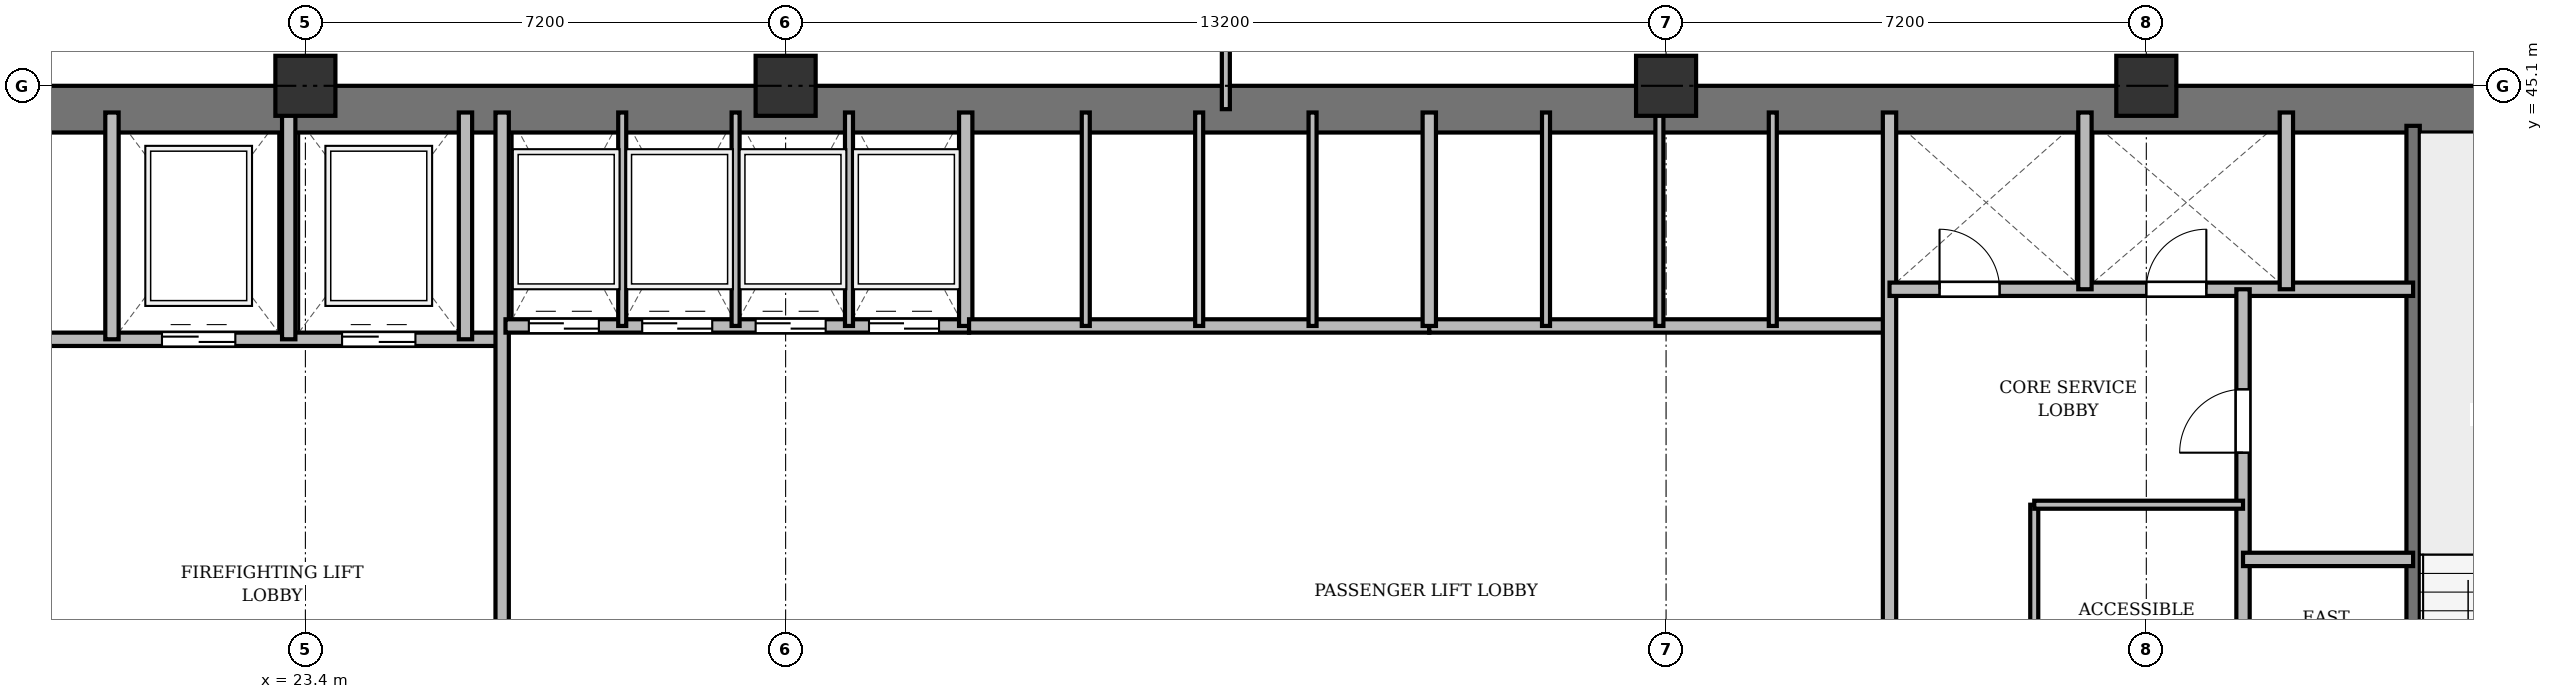
"""IFC4 building model, lengths in metres.
Left out: names, types, materials, properties, quantities, classifications, styles, units other than length and angle.
Written with IfcOpenShell. Run it as: python <this file> out.ifc"""

import sys

from ifc_helpers import new_model, si_unit, direction, frame, frame_2d, origin, origin_2d, place, context, subcontext, project, spatial, rectangle, extrude, source, transform, mapped, element, fill, save


model = new_model("IFC4")
c1 = context("Model", 3, precision=1e-05, world=origin(), true_north=direction((0.0, 1.0)))
c2 = subcontext(c1, "Body", "Model", "MODEL_VIEW")
j1 = project(units=[si_unit("LENGTHUNIT", "METRE"), si_unit("PLANEANGLEUNIT", "RADIAN")], contexts=[c1])
p1 = place(None, origin())
s1 = spatial("IfcSite", under=j1, at=p1, CompositionType="ELEMENT")
p2 = place(p1, origin())
s2 = spatial("IfcBuilding", under=s1, at=p2, CompositionType="ELEMENT")
p3 = place(p2, frame((0.0, 0.0, 23.5)))
s3 = spatial("IfcBuildingStorey", under=s2, at=p3, CompositionType="ELEMENT", Elevation=23.5)
m1 = source(origin(), c2, "Body", "SweptSolid", [
    extrude(rectangle(XDim=0.9, YDim=0.9, at=origin_2d()), origin(), (0.0, 0.0, 1.0), 3.6),
])
for number, where, z_axis, x_axis in (
    (1, (23.4, 45.1, 0.0), (0.0, 0.0, 1.0), (1.0, 0.0, 0.0)),
    (2, (30.6, 45.1, 0.0), (0.0, 0.0, 1.0), (1.0, 0.0, 0.0)),
    (3, (43.8, 45.1, 0.0), (0.0, 0.0, 1.0), (1.0, 0.0, 0.0)),
    (4, (51.0, 45.1, 0.0), (0.0, 0.0, 1.0), (1.0, 0.0, 0.0)),
):
    element("IfcColumn", number, at=place(p3, frame(where, z_axis=z_axis, x_axis=x_axis)), inside=s3, PredefinedType="COLUMN", context=c2, shape_type="MappedRepresentation", body=[
        mapped(m1, transform((0.0, 0.0, 0.0), x_axis=(1.0, 0.0, 0.0), y_axis=(0.0, 1.0, 0.0), z_axis=(0.0, 0.0, 1.0), scale=1.0)),
    ])
p4 = place(p3, frame((15.5, 44.75, 0.0), z_axis=(0.0, 0.0, 1.0), x_axis=(1.0, 0.0, 0.0)))
e5 = element("IfcWall", 5, at=p4, inside=s3, PredefinedType="SHEAR", context=c2, shape_type="SweptSolid", body=[
    extrude(rectangle(XDim=43.4, YDim=0.7, at=frame_2d((21.7, 0.0))), origin(), (0.0, 0.0, 1.0), 3.34),
])
p5 = place(p3, frame((55.0, 33.4, 0.0), z_axis=(0.0, 0.0, 1.0), x_axis=(0.0, 1.0, 0.0)))
e6 = element("IfcWall", 6, at=p5, inside=s3, PredefinedType="SHEAR", context=c2, shape_type="SweptSolid", body=[
    extrude(rectangle(XDim=11.1, YDim=0.2, at=frame_2d((5.55, 0.0))), origin(), (0.0, 0.0, 1.0), 3.34),
])
p6 = place(p5, frame((0.85, 0.0, 0.0)))
e7 = element("IfcOpeningElement", 7, at=p6, cuts=e6, PredefinedType="OPENING", context=c2, shape_type="SweptSolid", body=[
    extrude(rectangle(XDim=1.1, YDim=2.15, at=frame_2d((0.55, 1.075))), frame((0.0, 0.11, 0.0), z_axis=(0.0, -1.0, 0.0), x_axis=(1.0, 0.0, 0.0)), (0.0, 0.0, 1.0), 0.22),
])
p7 = place(p3, frame((19.55, 41.3, 0.0), z_axis=(0.0, 0.0, 1.0), x_axis=(1.0, 0.0, 0.0)))
e8 = element("IfcWall", 8, at=p7, inside=s3, PredefinedType="SOLIDWALL", context=c2, shape_type="SweptSolid", body=[
    extrude(rectangle(XDim=6.75, YDim=0.2, at=frame_2d((3.375, 0.0))), origin(), (0.0, 0.0, 1.0), 3.34),
])
p8 = place(p7, frame((1.7, 0.0, 0.0)))
e9 = element("IfcOpeningElement", 9, at=p8, cuts=e8, PredefinedType="OPENING", context=c2, shape_type="SweptSolid", body=[
    extrude(rectangle(XDim=1.1, YDim=2.15, at=frame_2d((0.55, 1.075))), frame((0.0, 0.11, 0.0), z_axis=(0.0, -1.0, 0.0), x_axis=(1.0, 0.0, 0.0)), (0.0, 0.0, 1.0), 0.22),
])
p9 = place(p7, frame((4.4, 0.0, 0.0)))
e10 = element("IfcOpeningElement", 10, at=p9, cuts=e8, PredefinedType="OPENING", context=c2, shape_type="SweptSolid", body=[
    extrude(rectangle(XDim=1.1, YDim=2.15, at=frame_2d((0.55, 1.075))), frame((0.0, 0.11, 0.0), z_axis=(0.0, -1.0, 0.0), x_axis=(1.0, 0.0, 0.0)), (0.0, 0.0, 1.0), 0.22),
])
for number, where, z_axis, x_axis in (
    (11, (20.5, 41.3, 0.0), (0.0, 0.0, 1.0), (0.0, 1.0, 0.0)),
    (12, (23.15, 41.3, 0.0), (0.0, 0.0, 1.0), (0.0, 1.0, 0.0)),
    (13, (25.8, 41.3, 0.0), (0.0, 0.0, 1.0), (0.0, 1.0, 0.0)),
):
    element("IfcWall", number, at=place(p3, frame(where, z_axis=z_axis, x_axis=x_axis)), inside=s3, PredefinedType="SOLIDWALL", context=c2, shape_type="SweptSolid", body=[
        extrude(rectangle(XDim=3.4, YDim=0.2, at=frame_2d((1.7, 0.0))), origin(), (0.0, 0.0, 1.0), 3.34),
    ])
p10 = place(p3, frame((26.35, 33.4, 0.0), z_axis=(0.0, 0.0, 1.0), x_axis=(0.0, 1.0, 0.0)))
e14 = element("IfcWall", 14, at=p10, inside=s3, PredefinedType="SOLIDWALL", context=c2, shape_type="SweptSolid", body=[
    extrude(rectangle(XDim=11.3, YDim=0.2, at=frame_2d((5.65, 0.0))), origin(), (0.0, 0.0, 1.0), 2.69),
])
p11 = place(p3, frame((26.4, 41.5, 0.0), z_axis=(0.0, 0.0, 1.0), x_axis=(1.0, 0.0, 0.0)))
e15 = element("IfcWall", 15, at=p11, inside=s3, PredefinedType="SOLIDWALL", context=c2, shape_type="SweptSolid", body=[
    extrude(rectangle(XDim=6.95, YDim=0.2, at=frame_2d((3.475, 0.0))), origin(), (0.0, 0.0, 1.0), 3.34),
])
p12 = place(p11, frame((0.35, 0.0, 0.0)))
e16 = element("IfcOpeningElement", 16, at=p12, cuts=e15, PredefinedType="OPENING", context=c2, shape_type="SweptSolid", body=[
    extrude(rectangle(XDim=1.05, YDim=2.15, at=frame_2d((0.525, 1.075))), frame((0.0, 0.11, 0.0), z_axis=(0.0, -1.0, 0.0), x_axis=(1.0, 0.0, 0.0)), (0.0, 0.0, 1.0), 0.22),
])
p13 = place(p11, frame((2.05, 0.0, 0.0)))
e17 = element("IfcOpeningElement", 17, at=p13, cuts=e15, PredefinedType="OPENING", context=c2, shape_type="SweptSolid", body=[
    extrude(rectangle(XDim=1.05, YDim=2.15, at=frame_2d((0.525, 1.075))), frame((0.0, 0.11, 0.0), z_axis=(0.0, -1.0, 0.0), x_axis=(1.0, 0.0, 0.0)), (0.0, 0.0, 1.0), 0.22),
])
p14 = place(p11, frame((3.75, 0.0, 0.0)))
e18 = element("IfcOpeningElement", 18, at=p14, cuts=e15, PredefinedType="OPENING", context=c2, shape_type="SweptSolid", body=[
    extrude(rectangle(XDim=1.05, YDim=2.15, at=frame_2d((0.525, 1.075))), frame((0.0, 0.11, 0.0), z_axis=(0.0, -1.0, 0.0), x_axis=(1.0, 0.0, 0.0)), (0.0, 0.0, 1.0), 0.22),
])
p15 = place(p11, frame((5.45, 0.0, 0.0)))
e19 = element("IfcOpeningElement", 19, at=p15, cuts=e15, PredefinedType="OPENING", context=c2, shape_type="SweptSolid", body=[
    extrude(rectangle(XDim=1.05, YDim=2.15, at=frame_2d((0.525, 1.075))), frame((0.0, 0.11, 0.0), z_axis=(0.0, -1.0, 0.0), x_axis=(1.0, 0.0, 0.0)), (0.0, 0.0, 1.0), 0.22),
])
p16 = place(p3, frame((33.3, 41.5, 0.0), z_axis=(0.0, 0.0, 1.0), x_axis=(0.0, 1.0, 0.0)))
e20 = element("IfcWall", 20, at=p16, inside=s3, PredefinedType="SOLIDWALL", context=c2, shape_type="SweptSolid", body=[
    extrude(rectangle(XDim=3.2, YDim=0.2, at=frame_2d((1.6, 0.0))), origin(), (0.0, 0.0, 1.0), 3.34),
])
for number, where, z_axis, x_axis in (
    (21, (28.15, 41.5, 0.0), (0.0, 0.0, 1.0), (0.0, 1.0, 0.0)),
    (22, (29.85, 41.5, 0.0), (0.0, 0.0, 1.0), (0.0, 1.0, 0.0)),
    (23, (31.55, 41.5, 0.0), (0.0, 0.0, 1.0), (0.0, 1.0, 0.0)),
):
    element("IfcWall", number, at=place(p3, frame(where, z_axis=z_axis, x_axis=x_axis)), inside=s3, PredefinedType="PARTITIONING", context=c2, shape_type="SweptSolid", body=[
        extrude(rectangle(XDim=3.2, YDim=0.12, at=frame_2d((1.6, 0.0))), origin(), (0.0, 0.0, 1.0), 3.34),
    ])
p17 = place(p3, frame((33.35, 41.5, 0.0), z_axis=(0.0, 0.0, 1.0), x_axis=(1.0, 0.0, 0.0)))
e24 = element("IfcWall", 24, at=p17, inside=s3, PredefinedType="SOLIDWALL", context=c2, shape_type="SweptSolid", body=[
    extrude(rectangle(XDim=6.9, YDim=0.2, at=frame_2d((3.45, 0.0))), origin(), (0.0, 0.0, 1.0), 3.34),
])
for number, where, z_axis, x_axis in (
    (25, (35.1, 41.5, 0.0), (0.0, 0.0, 1.0), (0.0, 1.0, 0.0)),
    (26, (36.8, 41.5, 0.0), (0.0, 0.0, 1.0), (0.0, 1.0, 0.0)),
    (27, (38.5, 41.5, 0.0), (0.0, 0.0, 1.0), (0.0, 1.0, 0.0)),
):
    element("IfcWall", number, at=place(p3, frame(where, z_axis=z_axis, x_axis=x_axis)), inside=s3, PredefinedType="PARTITIONING", context=c2, shape_type="SweptSolid", body=[
        extrude(rectangle(XDim=3.2, YDim=0.12, at=frame_2d((1.6, 0.0))), origin(), (0.0, 0.0, 1.0), 3.34),
    ])
p18 = place(p3, frame((40.25, 41.5, 0.0), z_axis=(0.0, 0.0, 1.0), x_axis=(1.0, 0.0, 0.0)))
e28 = element("IfcWall", 28, at=p18, inside=s3, PredefinedType="SOLIDWALL", context=c2, shape_type="SweptSolid", body=[
    extrude(rectangle(XDim=6.9, YDim=0.2, at=frame_2d((3.45, 0.0))), origin(), (0.0, 0.0, 1.0), 2.752),
])
p19 = place(p3, frame((40.25, 41.5, 0.0), z_axis=(0.0, 0.0, 1.0), x_axis=(0.0, 1.0, 0.0)))
e29 = element("IfcWall", 29, at=p19, inside=s3, PredefinedType="SOLIDWALL", context=c2, shape_type="SweptSolid", body=[
    extrude(rectangle(XDim=3.2, YDim=0.2, at=frame_2d((1.6, 0.0))), origin(), (0.0, 0.0, 1.0), 3.34),
])
p20 = place(p3, frame((42.0, 41.5, 0.0), z_axis=(0.0, 0.0, 1.0), x_axis=(0.0, 1.0, 0.0)))
e30 = element("IfcWall", 30, at=p20, inside=s3, PredefinedType="PARTITIONING", context=c2, shape_type="SweptSolid", body=[
    extrude(rectangle(XDim=3.2, YDim=0.12, at=frame_2d((1.6, 0.0))), origin(), (0.0, 0.0, 1.0), 3.34),
])
p21 = place(p3, frame((43.7, 41.5, 0.0), z_axis=(0.0, 0.0, 1.0), x_axis=(0.0, 1.0, 0.0)))
e31 = element("IfcWall", 31, at=p21, inside=s3, PredefinedType="PARTITIONING", context=c2, shape_type="SweptSolid", body=[
    extrude(rectangle(XDim=3.2, YDim=0.12, at=frame_2d((1.6, 0.0))), origin(), (0.0, 0.0, 1.0), 2.752),
])
p22 = place(p3, frame((45.4, 41.5, 0.0), z_axis=(0.0, 0.0, 1.0), x_axis=(0.0, 1.0, 0.0)))
e32 = element("IfcWall", 32, at=p22, inside=s3, PredefinedType="PARTITIONING", context=c2, shape_type="SweptSolid", body=[
    extrude(rectangle(XDim=3.2, YDim=0.12, at=frame_2d((1.6, 0.0))), origin(), (0.0, 0.0, 1.0), 3.34),
])
p23 = place(p3, frame((47.15, 33.4, 0.0), z_axis=(0.0, 0.0, 1.0), x_axis=(0.0, 1.0, 0.0)))
e33 = element("IfcWall", 33, at=p23, inside=s3, PredefinedType="SOLIDWALL", context=c2, shape_type="SweptSolid", body=[
    extrude(rectangle(XDim=11.3, YDim=0.2, at=frame_2d((5.65, 0.0))), origin(), (0.0, 0.0, 1.0), 2.69),
])
p24 = place(p3, frame((47.15, 42.05, 0.0), z_axis=(0.0, 0.0, 1.0), x_axis=(1.0, 0.0, 0.0)))
e34 = element("IfcWall", 34, at=p24, inside=s3, PredefinedType="SOLIDWALL", context=c2, shape_type="SweptSolid", body=[
    extrude(rectangle(XDim=7.85, YDim=0.2, at=frame_2d((3.925, 0.0))), origin(), (0.0, 0.0, 1.0), 2.752),
])
p25 = place(p24, frame((0.75, 0.0, 0.0)))
e35 = element("IfcOpeningElement", 35, at=p25, cuts=e34, PredefinedType="OPENING", context=c2, shape_type="SweptSolid", body=[
    extrude(rectangle(XDim=0.9, YDim=2.1, at=frame_2d((0.45, 1.05))), frame((0.0, 0.11, 0.0), z_axis=(0.0, -1.0, 0.0), x_axis=(1.0, 0.0, 0.0)), (0.0, 0.0, 1.0), 0.22),
])
p26 = place(p24, frame((3.85, 0.0, 0.0)))
e36 = element("IfcOpeningElement", 36, at=p26, cuts=e34, PredefinedType="OPENING", context=c2, shape_type="SweptSolid", body=[
    extrude(rectangle(XDim=0.9, YDim=2.1, at=frame_2d((0.45, 1.05))), frame((0.0, 0.11, 0.0), z_axis=(0.0, -1.0, 0.0), x_axis=(1.0, 0.0, 0.0)), (0.0, 0.0, 1.0), 0.22),
])
for number, where, z_axis, x_axis in (
    (37, (50.08, 42.05, 0.0), (0.0, 0.0, 1.0), (0.0, 1.0, 0.0)),
    (38, (53.1, 42.05, 0.0), (0.0, 0.0, 1.0), (0.0, 1.0, 0.0)),
):
    element("IfcWall", number, at=place(p3, frame(where, z_axis=z_axis, x_axis=x_axis)), inside=s3, PredefinedType="SOLIDWALL", context=c2, shape_type="SweptSolid", body=[
        extrude(rectangle(XDim=2.65, YDim=0.2, at=frame_2d((1.325, 0.0))), origin(), (0.0, 0.0, 1.0), 3.34),
    ])
p27 = place(p3, frame((52.45, 33.4, 0.0), z_axis=(0.0, 0.0, 1.0), x_axis=(0.0, 1.0, 0.0)))
e39 = element("IfcWall", 39, at=p27, inside=s3, PredefinedType="PARTITIONING", context=c2, shape_type="SweptSolid", body=[
    extrude(rectangle(XDim=8.65, YDim=0.2, at=frame_2d((4.325, 0.0))), origin(), (0.0, 0.0, 1.0), 2.69),
])
p28 = place(p27, frame((6.2, 0.0, 0.0)))
e40 = element("IfcOpeningElement", 40, at=p28, cuts=e39, PredefinedType="OPENING", context=c2, shape_type="SweptSolid", body=[
    extrude(rectangle(XDim=0.95, YDim=2.15, at=frame_2d((0.475, 1.075))), frame((0.0, 0.11, 0.0), z_axis=(0.0, -1.0, 0.0), x_axis=(1.0, 0.0, 0.0)), (0.0, 0.0, 1.0), 0.22),
])
p29 = place(p3, frame((52.45, 38.0, 0.0), z_axis=(0.0, 0.0, 1.0), x_axis=(1.0, 0.0, 0.0)))
e41 = element("IfcWall", 41, at=p29, inside=s3, PredefinedType="PARTITIONING", context=c2, shape_type="SweptSolid", body=[
    extrude(rectangle(XDim=2.55, YDim=0.2, at=frame_2d((1.275, 0.0))), origin(), (0.0, 0.0, 1.0), 3.34),
])
p30 = place(p3, frame((49.32, 33.4, 0.0), z_axis=(0.0, 0.0, 1.0), x_axis=(0.0, 1.0, 0.0)))
e42 = element("IfcWall", 42, at=p30, inside=s3, PredefinedType="PARTITIONING", context=c2, shape_type="SweptSolid", body=[
    extrude(rectangle(XDim=5.42, YDim=0.12, at=frame_2d((2.71, 0.0))), origin(), (0.0, 0.0, 1.0), 2.69),
])
p31 = place(p30, frame((1.6, 0.0, 0.0)))
e43 = element("IfcOpeningElement", 43, at=p31, cuts=e42, PredefinedType="OPENING", context=c2, shape_type="SweptSolid", body=[
    extrude(rectangle(XDim=0.95, YDim=2.15, at=frame_2d((0.475, 1.075))), frame((0.0, 0.07, 0.0), z_axis=(0.0, -1.0, 0.0), x_axis=(1.0, 0.0, 0.0)), (0.0, 0.0, 1.0), 0.14),
])
p32 = place(p3, frame((49.32, 38.82, 0.0), z_axis=(0.0, 0.0, 1.0), x_axis=(1.0, 0.0, 0.0)))
e44 = element("IfcWall", 44, at=p32, inside=s3, PredefinedType="PARTITIONING", context=c2, shape_type="SweptSolid", body=[
    extrude(rectangle(XDim=3.13, YDim=0.12, at=frame_2d((1.565, 0.0))), origin(), (0.0, 0.0, 1.0), 2.752),
])
p33 = place(p3, frame((37.2, 44.75, 0.0), z_axis=(0.0, 0.0, 1.0), x_axis=(0.0, 1.0, 0.0)))
e45 = element("IfcWall", 45, at=p33, inside=s3, PredefinedType="PARTITIONING", context=c2, shape_type="SweptSolid", body=[
    extrude(rectangle(XDim=3.61, YDim=0.12, at=frame_2d((1.805, 0.0))), origin(), (0.0, 0.0, 1.0), 2.69),
])
p34 = place(p33, frame((1.1, 0.0, 0.0)))
e46 = element("IfcOpeningElement", 46, at=p34, cuts=e45, PredefinedType="OPENING", context=c2, shape_type="SweptSolid", body=[
    extrude(rectangle(XDim=0.95, YDim=2.15, at=frame_2d((0.475, 1.075))), frame((0.0, 0.07, 0.0), z_axis=(0.0, -1.0, 0.0), x_axis=(1.0, 0.0, 0.0)), (0.0, 0.0, 1.0), 0.14),
])
m2 = source(origin(), c2, "Body", "SweptSolid", [
    extrude(rectangle(XDim=1.1, YDim=2.15, at=frame_2d((0.55, 1.075))), frame((0.0, 0.025, 0.0), z_axis=(0.0, -1.0, 0.0), x_axis=(1.0, 0.0, 0.0)), (0.0, 0.0, 1.0), 0.05),
])
p35 = place(p8, origin())
e47 = element("IfcDoor", 47, at=p35, inside=s3, OperationType="DOUBLE_DOOR_SLIDING", PredefinedType="DOOR", context=c2, shape_type="MappedRepresentation", body=[
    mapped(m2, transform((0.0, 0.0, 0.0), x_axis=(1.0, 0.0, 0.0), y_axis=(0.0, 1.0, 0.0), z_axis=(0.0, 0.0, 1.0), scale=1.0)),
])
fill(e9, e47)
p36 = place(p9, origin())
e48 = element("IfcDoor", 48, at=p36, inside=s3, OperationType="DOUBLE_DOOR_SLIDING", PredefinedType="DOOR", context=c2, shape_type="MappedRepresentation", body=[
    mapped(m2, transform((0.0, 0.0, 0.0), x_axis=(1.0, 0.0, 0.0), y_axis=(0.0, 1.0, 0.0), z_axis=(0.0, 0.0, 1.0), scale=1.0)),
])
fill(e10, e48)
m3 = source(origin(), c2, "Body", "SweptSolid", [
    extrude(rectangle(XDim=1.05, YDim=2.15, at=frame_2d((0.525, 1.075))), frame((0.0, 0.025, 0.0), z_axis=(0.0, -1.0, 0.0), x_axis=(1.0, 0.0, 0.0)), (0.0, 0.0, 1.0), 0.05),
])
p37 = place(p12, origin())
e49 = element("IfcDoor", 49, at=p37, inside=s3, OperationType="DOUBLE_DOOR_SLIDING", PredefinedType="DOOR", context=c2, shape_type="MappedRepresentation", body=[
    mapped(m3, transform((0.0, 0.0, 0.0), x_axis=(1.0, 0.0, 0.0), y_axis=(0.0, 1.0, 0.0), z_axis=(0.0, 0.0, 1.0), scale=1.0)),
])
fill(e16, e49)
p38 = place(p13, origin())
e50 = element("IfcDoor", 50, at=p38, inside=s3, OperationType="DOUBLE_DOOR_SLIDING", PredefinedType="DOOR", context=c2, shape_type="MappedRepresentation", body=[
    mapped(m3, transform((0.0, 0.0, 0.0), x_axis=(1.0, 0.0, 0.0), y_axis=(0.0, 1.0, 0.0), z_axis=(0.0, 0.0, 1.0), scale=1.0)),
])
fill(e17, e50)
p39 = place(p14, origin())
e51 = element("IfcDoor", 51, at=p39, inside=s3, OperationType="DOUBLE_DOOR_SLIDING", PredefinedType="DOOR", context=c2, shape_type="MappedRepresentation", body=[
    mapped(m3, transform((0.0, 0.0, 0.0), x_axis=(1.0, 0.0, 0.0), y_axis=(0.0, 1.0, 0.0), z_axis=(0.0, 0.0, 1.0), scale=1.0)),
])
fill(e18, e51)
p40 = place(p15, origin())
e52 = element("IfcDoor", 52, at=p40, inside=s3, OperationType="DOUBLE_DOOR_SLIDING", PredefinedType="DOOR", context=c2, shape_type="MappedRepresentation", body=[
    mapped(m3, transform((0.0, 0.0, 0.0), x_axis=(1.0, 0.0, 0.0), y_axis=(0.0, 1.0, 0.0), z_axis=(0.0, 0.0, 1.0), scale=1.0)),
])
fill(e19, e52)
m4 = source(origin(), c2, "Body", "SweptSolid", [
    extrude(rectangle(XDim=0.9, YDim=2.1, at=frame_2d((0.45, 1.05))), frame((0.0, 0.025, 0.0), z_axis=(0.0, -1.0, 0.0), x_axis=(1.0, 0.0, 0.0)), (0.0, 0.0, 1.0), 0.05),
])
p41 = place(p25, origin())
e53 = element("IfcDoor", 53, at=p41, inside=s3, OperationType="SINGLE_SWING_LEFT", PredefinedType="DOOR", context=c2, shape_type="MappedRepresentation", body=[
    mapped(m4, transform((0.0, 0.0, 0.0), x_axis=(1.0, 0.0, 0.0), y_axis=(0.0, 1.0, 0.0), z_axis=(0.0, 0.0, 1.0), scale=1.0)),
])
fill(e35, e53)
p42 = place(p26, origin())
e54 = element("IfcDoor", 54, at=p42, inside=s3, OperationType="SINGLE_SWING_RIGHT", PredefinedType="DOOR", context=c2, shape_type="MappedRepresentation", body=[
    mapped(m4, transform((0.0, 0.0, 0.0), x_axis=(1.0, 0.0, 0.0), y_axis=(0.0, 1.0, 0.0), z_axis=(0.0, 0.0, 1.0), scale=1.0)),
])
fill(e36, e54)
m5 = source(origin(), c2, "Body", "SweptSolid", [
    extrude(rectangle(XDim=0.95, YDim=2.15, at=frame_2d((0.475, 1.075))), frame((0.0, 0.025, 0.0), z_axis=(0.0, -1.0, 0.0), x_axis=(1.0, 0.0, 0.0)), (0.0, 0.0, 1.0), 0.05),
])
p43 = place(p28, origin())
e55 = element("IfcDoor", 55, at=p43, inside=s3, OperationType="SINGLE_SWING_LEFT", PredefinedType="DOOR", context=c2, shape_type="MappedRepresentation", body=[
    mapped(m5, transform((0.0, 0.0, 0.0), x_axis=(1.0, 0.0, 0.0), y_axis=(0.0, 1.0, 0.0), z_axis=(0.0, 0.0, 1.0), scale=1.0)),
])
fill(e40, e55)
save(model, sys.argv[1])
